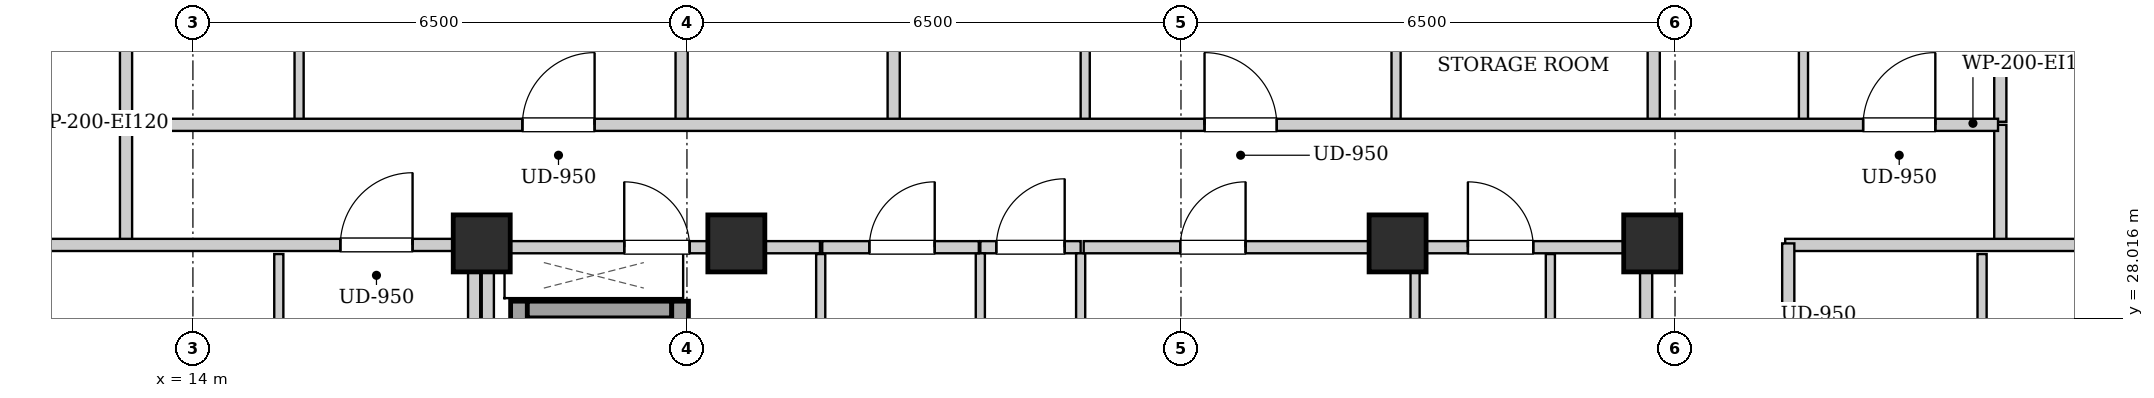
"""IFC4 building model, lengths in metres.
Left out: names, types, materials, properties, quantities, classifications, styles, units other than length and angle.
Written with IfcOpenShell. Run it as: python <this file> out.ifc"""

import sys

from ifc_helpers import new_model, si_unit, direction, frame, frame_2d, origin, origin_2d, place, context, subcontext, project, spatial, rectangle, extrude, element, fill, save


model = new_model("IFC4")
c1 = context("Model", 3, precision=1e-05, world=origin(), true_north=direction((0.0, 1.0)))
c2 = subcontext(c1, "Body", "Model", "MODEL_VIEW")
j1 = project(units=[si_unit("LENGTHUNIT", "METRE"), si_unit("PLANEANGLEUNIT", "RADIAN")], contexts=[c1])
p1 = place(None, origin())
s1 = spatial("IfcSite", under=j1, at=p1, CompositionType="ELEMENT")
p2 = place(p1, origin())
s2 = spatial("IfcBuilding", under=s1, at=p2, CompositionType="ELEMENT")
p3 = place(p2, frame((0.0, 0.0, 234.3)))
s3 = spatial("IfcBuildingStorey", under=s2, at=p3, CompositionType="ELEMENT", Elevation=234.3)
for number, where, z_axis, x_axis in (
    (1, (17.8, 29.0, 0.0), (0.0, 0.0, 1.0), (1.0, 0.0, 0.0)),
    (2, (21.15, 29.0, 0.0), (0.0, 0.0, 1.0), (1.0, 0.0, 0.0)),
    (3, (29.85, 29.0, 0.0), (0.0, 0.0, 1.0), (1.0, 0.0, 0.0)),
    (4, (33.2, 29.0, 0.0), (0.0, 0.0, 1.0), (1.0, 0.0, 0.0)),
):
    element("IfcColumn", number, at=place(p3, frame(where, z_axis=z_axis, x_axis=x_axis)), inside=s3, PredefinedType="COLUMN", context=c2, shape_type="SweptSolid", body=[
        extrude(rectangle(XDim=0.75, YDim=0.75, at=origin_2d()), origin(), (0.0, 0.0, 1.0), 3.4),
    ])
p4 = place(p3, frame((18.29, 24.1, 0.0), z_axis=(0.0, 0.0, 1.0), x_axis=(0.0, 1.0, 0.0)))
e5 = element("IfcWall", 5, at=p4, inside=s3, PredefinedType="SHEAR", context=c2, shape_type="SweptSolid", body=[
    extrude(rectangle(XDim=4.14, YDim=0.22, at=frame_2d((2.07, 0.0))), origin(), (0.0, 0.0, 1.0), 3.14),
])
p5 = place(p3, frame((18.4, 28.13, 0.0), z_axis=(0.0, 0.0, 1.0), x_axis=(1.0, 0.0, 0.0)))
e6 = element("IfcWall", 6, at=p5, inside=s3, PredefinedType="SHEAR", context=c2, shape_type="SweptSolid", body=[
    extrude(rectangle(XDim=1.9, YDim=0.22, at=frame_2d((0.95, 0.0))), origin(), (0.0, 0.0, 1.0), 3.14),
])
p6 = place(p3, frame((20.41, 26.06, 0.0), z_axis=(0.0, 0.0, 1.0), x_axis=(0.0, 1.0, 0.0)))
e7 = element("IfcWall", 7, at=p6, inside=s3, PredefinedType="SHEAR", context=c2, shape_type="SweptSolid", body=[
    extrude(rectangle(XDim=2.18, YDim=0.22, at=frame_2d((1.09, 0.0))), origin(), (0.0, 0.0, 1.0), 3.14),
])
p7 = place(p6, frame((0.54, 0.0, 0.0)))
e8 = element("IfcOpeningElement", 8, at=p7, cuts=e7, PredefinedType="OPENING", context=c2, shape_type="SweptSolid", body=[
    extrude(rectangle(XDim=1.1, YDim=2.15, at=frame_2d((0.55, 1.075))), frame((0.0, 0.12, 0.0), z_axis=(0.0, -1.0, 0.0), x_axis=(1.0, 0.0, 0.0)), (0.0, 0.0, 1.0), 0.24),
])
for number, where, z_axis, x_axis in (
    (9, (17.88, 24.12, 0.0), (0.0, 0.0, 1.0), (0.0, 1.0, 0.0)),
    (10, (33.12, 24.12, 0.0), (0.0, 0.0, 1.0), (0.0, 1.0, 0.0)),
):
    element("IfcWall", number, at=place(p3, frame(where, z_axis=z_axis, x_axis=x_axis)), inside=s3, PredefinedType="PARTITIONING", context=c2, shape_type="SweptSolid", body=[
        extrude(rectangle(XDim=4.76, YDim=0.16, at=frame_2d((2.38, 0.0))), origin(), (0.0, 0.0, 1.0), 3.14),
    ])
p8 = place(p3, frame((24.36, 28.95, 0.0), z_axis=(0.0, 0.0, 1.0), x_axis=(1.0, 0.0, 0.0)))
e11 = element("IfcWall", 11, at=p8, inside=s3, PredefinedType="PARTITIONING", context=c2, shape_type="SweptSolid", body=[
    extrude(rectangle(XDim=1.32, YDim=0.16, at=frame_2d((0.66, 0.0))), origin(), (0.0, 0.0, 1.0), 2.668),
])
p9 = place(p8, frame((0.21, 0.0, 0.0)))
e12 = element("IfcOpeningElement", 12, at=p9, cuts=e11, PredefinedType="OPENING", context=c2, shape_type="SweptSolid", body=[
    extrude(rectangle(XDim=0.9, YDim=2.05, at=frame_2d((0.45, 1.025))), frame((0.0, 0.09, 0.0), z_axis=(0.0, -1.0, 0.0), x_axis=(1.0, 0.0, 0.0)), (0.0, 0.0, 1.0), 0.18),
])
p10 = place(p3, frame((17.96, 28.95, 0.0), z_axis=(0.0, 0.0, 1.0), x_axis=(1.0, 0.0, 0.0)))
e13 = element("IfcWall", 13, at=p10, inside=s3, PredefinedType="PARTITIONING", context=c2, shape_type="SweptSolid", body=[
    extrude(rectangle(XDim=4.29, YDim=0.16, at=frame_2d((2.145, 0.0))), origin(), (0.0, 0.0, 1.0), 2.668),
])
p11 = place(p10, frame((1.715, 0.0, 0.0)))
e14 = element("IfcOpeningElement", 14, at=p11, cuts=e13, PredefinedType="OPENING", context=c2, shape_type="SweptSolid", body=[
    extrude(rectangle(XDim=0.86, YDim=2.05, at=frame_2d((0.43, 1.025))), frame((0.0, 0.09, 0.0), z_axis=(0.0, -1.0, 0.0), x_axis=(1.0, 0.0, 0.0)), (0.0, 0.0, 1.0), 0.18),
])
for number, where, z_axis, x_axis in (
    (15, (24.36, 25.0, 0.0), (0.0, 0.0, 1.0), (0.0, 1.0, 0.0)),
    (16, (25.68, 25.0, 0.0), (0.0, 0.0, 1.0), (0.0, 1.0, 0.0)),
):
    element("IfcWall", number, at=place(p3, frame(where, z_axis=z_axis, x_axis=x_axis)), inside=s3, PredefinedType="PARTITIONING", context=c2, shape_type="SweptSolid", body=[
        extrude(rectangle(XDim=3.87, YDim=0.12, at=frame_2d((1.935, 0.0))), origin(), (0.0, 0.0, 1.0), 3.14),
    ])
p12 = place(p3, frame((30.08, 26.18, 0.0), z_axis=(0.0, 0.0, 1.0), x_axis=(0.0, 1.0, 0.0)))
e17 = element("IfcWall", 17, at=p12, inside=s3, PredefinedType="PARTITIONING", context=c2, shape_type="SweptSolid", body=[
    extrude(rectangle(XDim=2.68, YDim=0.12, at=frame_2d((1.34, 0.0))), origin(), (0.0, 0.0, 1.0), 3.14),
])
p13 = place(p3, frame((31.86, 26.2, 0.0), z_axis=(0.0, 0.0, 1.0), x_axis=(0.0, 1.0, 0.0)))
e18 = element("IfcWall", 18, at=p13, inside=s3, PredefinedType="PARTITIONING", context=c2, shape_type="SweptSolid", body=[
    extrude(rectangle(XDim=2.66, YDim=0.12, at=frame_2d((1.33, 0.0))), origin(), (0.0, 0.0, 1.0), 3.14),
])
p14 = place(p13, frame((0.92, 0.0, 0.0)))
e19 = element("IfcOpeningElement", 19, at=p14, cuts=e18, PredefinedType="OPENING", context=c2, shape_type="SweptSolid", body=[
    extrude(rectangle(XDim=0.86, YDim=2.05, at=frame_2d((0.43, 1.025))), frame((0.0, 0.07, 0.0), z_axis=(0.0, -1.0, 0.0), x_axis=(1.0, 0.0, 0.0)), (0.0, 0.0, 1.0), 0.14),
])
p15 = place(p3, frame((30.08, 28.95, 0.0), z_axis=(0.0, 0.0, 1.0), x_axis=(1.0, 0.0, 0.0)))
e20 = element("IfcWall", 20, at=p15, inside=s3, PredefinedType="PARTITIONING", context=c2, shape_type="SweptSolid", body=[
    extrude(rectangle(XDim=2.96, YDim=0.16, at=frame_2d((1.48, 0.0))), origin(), (0.0, 0.0, 1.0), 3.14),
])
p16 = place(p15, frame((0.695, 0.0, 0.0)))
e21 = element("IfcOpeningElement", 21, at=p16, cuts=e20, PredefinedType="OPENING", context=c2, shape_type="SweptSolid", body=[
    extrude(rectangle(XDim=0.86, YDim=2.05, at=frame_2d((0.43, 1.025))), frame((0.0, 0.09, 0.0), z_axis=(0.0, -1.0, 0.0), x_axis=(1.0, 0.0, 0.0)), (0.0, 0.0, 1.0), 0.18),
])
p17 = place(p3, frame((22.26, 25.0, 0.0), z_axis=(0.0, 0.0, 1.0), x_axis=(0.0, 1.0, 0.0)))
e22 = element("IfcWall", 22, at=p17, inside=s3, PredefinedType="PARTITIONING", context=c2, shape_type="SweptSolid", body=[
    extrude(rectangle(XDim=3.86, YDim=0.12, at=frame_2d((1.93, 0.0))), origin(), (0.0, 0.0, 1.0), 3.14),
])
p18 = place(p3, frame((22.28, 28.95, 0.0), z_axis=(0.0, 0.0, 1.0), x_axis=(1.0, 0.0, 0.0)))
e23 = element("IfcWall", 23, at=p18, inside=s3, PredefinedType="PARTITIONING", context=c2, shape_type="SweptSolid", body=[
    extrude(rectangle(XDim=2.06, YDim=0.16, at=frame_2d((1.03, 0.0))), origin(), (0.0, 0.0, 1.0), 2.668),
])
p19 = place(p18, frame((0.62, 0.0, 0.0)))
e24 = element("IfcOpeningElement", 24, at=p19, cuts=e23, PredefinedType="OPENING", context=c2, shape_type="SweptSolid", body=[
    extrude(rectangle(XDim=0.86, YDim=2.05, at=frame_2d((0.43, 1.025))), frame((0.0, 0.09, 0.0), z_axis=(0.0, -1.0, 0.0), x_axis=(1.0, 0.0, 0.0)), (0.0, 0.0, 1.0), 0.18),
])
p20 = place(p3, frame((25.72, 28.95, 0.0), z_axis=(0.0, 0.0, 1.0), x_axis=(1.0, 0.0, 0.0)))
e25 = element("IfcWall", 25, at=p20, inside=s3, PredefinedType="PARTITIONING", context=c2, shape_type="SweptSolid", body=[
    extrude(rectangle(XDim=4.32, YDim=0.16, at=frame_2d((2.16, 0.0))), origin(), (0.0, 0.0, 1.0), 2.668),
])
p21 = place(p20, frame((1.27, 0.0, 0.0)))
e26 = element("IfcOpeningElement", 26, at=p21, cuts=e25, PredefinedType="OPENING", context=c2, shape_type="SweptSolid", body=[
    extrude(rectangle(XDim=0.86, YDim=2.05, at=frame_2d((0.43, 1.025))), frame((0.0, 0.09, 0.0), z_axis=(0.0, -1.0, 0.0), x_axis=(1.0, 0.0, 0.0)), (0.0, 0.0, 1.0), 0.18),
])
for number, where, z_axis, x_axis in (
    (27, (13.12, 28.98, 0.0), (0.0, 0.0, 1.0), (0.0, 1.0, 0.0)),
    (28, (37.78, 28.98, 0.0), (0.0, 0.0, 1.0), (0.0, 1.0, 0.0)),
):
    element("IfcWall", number, at=place(p3, frame(where, z_axis=z_axis, x_axis=x_axis)), inside=s3, PredefinedType="PARTITIONING", context=c2, shape_type="SweptSolid", body=[
        extrude(rectangle(XDim=1.58, YDim=0.16, at=frame_2d((0.79, 0.0))), origin(), (0.0, 0.0, 1.0), 3.14),
    ])
p22 = place(p3, frame((34.95, 28.98, 0.0), z_axis=(0.0, 0.0, 1.0), x_axis=(1.0, 0.0, 0.0)))
e29 = element("IfcWall", 29, at=p22, inside=s3, PredefinedType="PARTITIONING", context=c2, shape_type="SweptSolid", body=[
    extrude(rectangle(XDim=5.07, YDim=0.16, at=frame_2d((2.535, 0.0))), origin(), (0.0, 0.0, 1.0), 2.668),
])
p23 = place(p3, frame((13.12, 30.6, 0.0), z_axis=(0.0, 0.0, 1.0), x_axis=(0.0, 1.0, 0.0)))
e30 = element("IfcWall", 30, at=p23, inside=s3, PredefinedType="PARTITIONING", context=c2, shape_type="SweptSolid", body=[
    extrude(rectangle(XDim=2.91, YDim=0.16, at=frame_2d((1.455, 0.0))), origin(), (0.0, 0.0, 1.0), 3.14),
])
p24 = place(p3, frame((20.43, 30.6, 0.0), z_axis=(0.0, 0.0, 1.0), x_axis=(0.0, 1.0, 0.0)))
e31 = element("IfcWall", 31, at=p24, inside=s3, PredefinedType="PARTITIONING", context=c2, shape_type="SweptSolid", body=[
    extrude(rectangle(XDim=9.32, YDim=0.16, at=frame_2d((4.66, 0.0))), origin(), (0.0, 0.0, 1.0), 3.14),
])
p25 = place(p3, frame((15.397, 30.6, 0.0), z_axis=(0.0, 0.0, 1.0), x_axis=(0.0, 1.0, 0.0)))
e32 = element("IfcWall", 32, at=p25, inside=s3, PredefinedType="PARTITIONING", context=c2, shape_type="SweptSolid", body=[
    extrude(rectangle(XDim=2.85, YDim=0.12, at=frame_2d((1.425, 0.0))), origin(), (0.0, 0.0, 1.0), 3.14),
])
p26 = place(p25, frame((0.995, 0.0, 0.0)))
e33 = element("IfcOpeningElement", 33, at=p26, cuts=e32, PredefinedType="OPENING", context=c2, shape_type="SweptSolid", body=[
    extrude(rectangle(XDim=0.86, YDim=2.05, at=frame_2d((0.43, 1.025))), frame((0.0, 0.07, 0.0), z_axis=(0.0, -1.0, 0.0), x_axis=(1.0, 0.0, 0.0)), (0.0, 0.0, 1.0), 0.14),
])
p27 = place(p3, frame((23.22, 30.6, 0.0), z_axis=(0.0, 0.0, 1.0), x_axis=(0.0, 1.0, 0.0)))
e34 = element("IfcWall", 34, at=p27, inside=s3, PredefinedType="PARTITIONING", context=c2, shape_type="SweptSolid", body=[
    extrude(rectangle(XDim=9.32, YDim=0.16, at=frame_2d((4.66, 0.0))), origin(), (0.0, 0.0, 1.0), 3.14),
])
p28 = place(p3, frame((25.74, 30.6, 0.0), z_axis=(0.0, 0.0, 1.0), x_axis=(0.0, 1.0, 0.0)))
e35 = element("IfcWall", 35, at=p28, inside=s3, PredefinedType="PARTITIONING", context=c2, shape_type="SweptSolid", body=[
    extrude(rectangle(XDim=2.85, YDim=0.12, at=frame_2d((1.425, 0.0))), origin(), (0.0, 0.0, 1.0), 3.14),
])
p29 = place(p28, frame((0.995, 0.0, 0.0)))
e36 = element("IfcOpeningElement", 36, at=p29, cuts=e35, PredefinedType="OPENING", context=c2, shape_type="SweptSolid", body=[
    extrude(rectangle(XDim=0.86, YDim=2.05, at=frame_2d((0.43, 1.025))), frame((0.0, 0.07, 0.0), z_axis=(0.0, -1.0, 0.0), x_axis=(1.0, 0.0, 0.0)), (0.0, 0.0, 1.0), 0.14),
])
p30 = place(p3, frame((29.83, 30.6, 0.0), z_axis=(0.0, 0.0, 1.0), x_axis=(0.0, 1.0, 0.0)))
e37 = element("IfcWall", 37, at=p30, inside=s3, PredefinedType="PARTITIONING", context=c2, shape_type="SweptSolid", body=[
    extrude(rectangle(XDim=2.85, YDim=0.12, at=frame_2d((1.425, 0.0))), origin(), (0.0, 0.0, 1.0), 3.14),
])
p31 = place(p30, frame((0.975, 0.0, 0.0)))
e38 = element("IfcOpeningElement", 38, at=p31, cuts=e37, PredefinedType="OPENING", context=c2, shape_type="SweptSolid", body=[
    extrude(rectangle(XDim=0.9, YDim=2.05, at=frame_2d((0.45, 1.025))), frame((0.0, 0.07, 0.0), z_axis=(0.0, -1.0, 0.0), x_axis=(1.0, 0.0, 0.0)), (0.0, 0.0, 1.0), 0.14),
])
p32 = place(p3, frame((37.78, 30.6, 0.0), z_axis=(0.0, 0.0, 1.0), x_axis=(0.0, 1.0, 0.0)))
e39 = element("IfcWall", 39, at=p32, inside=s3, PredefinedType="PARTITIONING", context=c2, shape_type="SweptSolid", body=[
    extrude(rectangle(XDim=2.91, YDim=0.16, at=frame_2d((1.455, 0.0))), origin(), (0.0, 0.0, 1.0), 3.14),
])
p33 = place(p3, frame((33.22, 30.6, 0.0), z_axis=(0.0, 0.0, 1.0), x_axis=(0.0, 1.0, 0.0)))
e40 = element("IfcWall", 40, at=p33, inside=s3, PredefinedType="PARTITIONING", context=c2, shape_type="SweptSolid", body=[
    extrude(rectangle(XDim=7.34, YDim=0.16, at=frame_2d((3.67, 0.0))), origin(), (0.0, 0.0, 1.0), 2.668),
])
p34 = place(p3, frame((35.19, 30.6, 0.0), z_axis=(0.0, 0.0, 1.0), x_axis=(0.0, 1.0, 0.0)))
e41 = element("IfcWall", 41, at=p34, inside=s3, PredefinedType="PARTITIONING", context=c2, shape_type="SweptSolid", body=[
    extrude(rectangle(XDim=2.85, YDim=0.12, at=frame_2d((1.425, 0.0))), origin(), (0.0, 0.0, 1.0), 3.14),
])
p35 = place(p34, frame((0.995, 0.0, 0.0)))
e42 = element("IfcOpeningElement", 42, at=p35, cuts=e41, PredefinedType="OPENING", context=c2, shape_type="SweptSolid", body=[
    extrude(rectangle(XDim=0.86, YDim=2.05, at=frame_2d((0.43, 1.025))), frame((0.0, 0.07, 0.0), z_axis=(0.0, -1.0, 0.0), x_axis=(1.0, 0.0, 0.0)), (0.0, 0.0, 1.0), 0.14),
])
p36 = place(p3, frame((10.88, 28.98, 0.0), z_axis=(0.0, 0.0, 1.0), x_axis=(1.0, 0.0, 0.0)))
e43 = element("IfcWall", 43, at=p36, inside=s3, PredefinedType="PARTITIONING", context=c2, shape_type="SweptSolid", body=[
    extrude(rectangle(XDim=6.88, YDim=0.16, at=frame_2d((3.44, 0.0))), origin(), (0.0, 0.0, 1.0), 2.668),
])
p37 = place(p36, frame((5.06, 0.0, 0.0)))
e44 = element("IfcOpeningElement", 44, at=p37, cuts=e43, PredefinedType="OPENING", context=c2, shape_type="SweptSolid", body=[
    extrude(rectangle(XDim=0.95, YDim=2.1, at=frame_2d((0.475, 1.05))), frame((0.0, 0.09, 0.0), z_axis=(0.0, -1.0, 0.0), x_axis=(1.0, 0.0, 0.0)), (0.0, 0.0, 1.0), 0.18),
])
p38 = place(p3, frame((15.13, 25.052, 0.0), z_axis=(0.0, 0.0, 1.0), x_axis=(0.0, 1.0, 0.0)))
e45 = element("IfcWall", 45, at=p38, inside=s3, PredefinedType="PARTITIONING", context=c2, shape_type="SweptSolid", body=[
    extrude(rectangle(XDim=3.808, YDim=0.12, at=frame_2d((1.904, 0.0))), origin(), (0.0, 0.0, 1.0), 3.14),
])
p39 = place(p38, frame((1.454, 0.0, 0.0)))
e46 = element("IfcOpeningElement", 46, at=p39, cuts=e45, PredefinedType="OPENING", context=c2, shape_type="SweptSolid", body=[
    extrude(rectangle(XDim=0.9, YDim=2.05, at=frame_2d((0.45, 1.025))), frame((0.0, 0.07, 0.0), z_axis=(0.0, -1.0, 0.0), x_axis=(1.0, 0.0, 0.0)), (0.0, 0.0, 1.0), 0.14),
])
p40 = place(p3, frame((37.54, 25.052, 0.0), z_axis=(0.0, 0.0, 1.0), x_axis=(0.0, 1.0, 0.0)))
e47 = element("IfcWall", 47, at=p40, inside=s3, PredefinedType="PARTITIONING", context=c2, shape_type="SweptSolid", body=[
    extrude(rectangle(XDim=3.808, YDim=0.12, at=frame_2d((1.904, 0.0))), origin(), (0.0, 0.0, 1.0), 3.14),
])
p41 = place(p40, frame((1.454, 0.0, 0.0)))
e48 = element("IfcOpeningElement", 48, at=p41, cuts=e47, PredefinedType="OPENING", context=c2, shape_type="SweptSolid", body=[
    extrude(rectangle(XDim=0.9, YDim=2.05, at=frame_2d((0.45, 1.025))), frame((0.0, 0.07, 0.0), z_axis=(0.0, -1.0, 0.0), x_axis=(1.0, 0.0, 0.0)), (0.0, 0.0, 1.0), 0.14),
])
p42 = place(p3, frame((13.15, 30.56, 0.0), z_axis=(0.0, 0.0, 1.0), x_axis=(1.0, 0.0, 0.0)))
e49 = element("IfcWall", 49, at=p42, inside=s3, PredefinedType="PARTITIONING", context=c2, shape_type="SweptSolid", body=[
    extrude(rectangle(XDim=24.6, YDim=0.16, at=frame_2d((12.3, 0.0))), origin(), (0.0, 0.0, 1.0), 3.14),
])
p43 = place(p42, frame((5.185, 0.0, 0.0)))
e50 = element("IfcOpeningElement", 50, at=p43, cuts=e49, PredefinedType="OPENING", context=c2, shape_type="SweptSolid", body=[
    extrude(rectangle(XDim=0.95, YDim=2.1, at=frame_2d((0.475, 1.05))), frame((0.0, 0.09, 0.0), z_axis=(0.0, -1.0, 0.0), x_axis=(1.0, 0.0, 0.0)), (0.0, 0.0, 1.0), 0.18),
])
p44 = place(p42, frame((14.16, 0.0, 0.0)))
e51 = element("IfcOpeningElement", 51, at=p44, cuts=e49, PredefinedType="OPENING", context=c2, shape_type="SweptSolid", body=[
    extrude(rectangle(XDim=0.95, YDim=2.1, at=frame_2d((0.475, 1.05))), frame((0.0, 0.09, 0.0), z_axis=(0.0, -1.0, 0.0), x_axis=(1.0, 0.0, 0.0)), (0.0, 0.0, 1.0), 0.18),
])
p45 = place(p42, frame((22.825, 0.0, 0.0)))
e52 = element("IfcOpeningElement", 52, at=p45, cuts=e49, PredefinedType="OPENING", context=c2, shape_type="SweptSolid", body=[
    extrude(rectangle(XDim=0.95, YDim=2.1, at=frame_2d((0.475, 1.05))), frame((0.0, 0.09, 0.0), z_axis=(0.0, -1.0, 0.0), x_axis=(1.0, 0.0, 0.0)), (0.0, 0.0, 1.0), 0.18),
])
p46 = place(p3, frame((17.7, 15.02, 0.0), z_axis=(0.0, 0.0, 1.0), x_axis=(0.0, 1.0, 0.0)))
e53 = element("IfcWall", 53, at=p46, inside=s3, PredefinedType="PARTITIONING", context=c2, shape_type="SweptSolid", body=[
    extrude(rectangle(XDim=13.98, YDim=0.16, at=frame_2d((6.99, 0.0))), origin(), (0.0, 0.0, 1.0), 3.14),
])
p47 = place(p3, frame((34.99, 15.07, 0.0), z_axis=(0.0, 0.0, 1.0), x_axis=(0.0, 1.0, 0.0)))
e54 = element("IfcWall", 54, at=p47, inside=s3, PredefinedType="PARTITIONING", context=c2, shape_type="SweptSolid", body=[
    extrude(rectangle(XDim=13.93, YDim=0.16, at=frame_2d((6.965, 0.0))), origin(), (0.0, 0.0, 1.0), 3.14),
])
p48 = place(p47, frame((4.661, 0.0, 0.0)))
e55 = element("IfcOpeningElement", 55, at=p48, cuts=e54, PredefinedType="OPENING", context=c2, shape_type="SweptSolid", body=[
    extrude(rectangle(XDim=0.95, YDim=2.1, at=frame_2d((0.475, 1.05))), frame((0.0, 0.09, 0.0), z_axis=(0.0, -1.0, 0.0), x_axis=(1.0, 0.0, 0.0)), (0.0, 0.0, 1.0), 0.18),
])
p49 = place(p47, frame((11.411, 0.0, 0.0)))
e56 = element("IfcOpeningElement", 56, at=p49, cuts=e54, PredefinedType="OPENING", context=c2, shape_type="SweptSolid", body=[
    extrude(rectangle(XDim=0.95, YDim=2.1, at=frame_2d((0.475, 1.05))), frame((0.0, 0.09, 0.0), z_axis=(0.0, -1.0, 0.0), x_axis=(1.0, 0.0, 0.0)), (0.0, 0.0, 1.0), 0.18),
])
p50 = place(p9, origin())
e57 = element("IfcDoor", 57, at=p50, inside=s3, OperationType="SINGLE_SWING_RIGHT", PredefinedType="DOOR", context=c2, shape_type="SweptSolid", body=[
    extrude(rectangle(XDim=0.9, YDim=2.05, at=frame_2d((0.45, 1.025))), frame((0.0, 0.025, 0.0), z_axis=(0.0, -1.0, 0.0), x_axis=(1.0, 0.0, 0.0)), (0.0, 0.0, 1.0), 0.05),
])
fill(e12, e57)
p51 = place(p11, origin())
e58 = element("IfcDoor", 58, at=p51, inside=s3, OperationType="SINGLE_SWING_LEFT", PredefinedType="DOOR", context=c2, shape_type="SweptSolid", body=[
    extrude(rectangle(XDim=0.86, YDim=2.05, at=frame_2d((0.43, 1.025))), frame((0.0, 0.025, 0.0), z_axis=(0.0, -1.0, 0.0), x_axis=(1.0, 0.0, 0.0)), (0.0, 0.0, 1.0), 0.05),
])
fill(e14, e58)
p52 = place(p16, origin())
e59 = element("IfcDoor", 59, at=p52, inside=s3, OperationType="SINGLE_SWING_LEFT", PredefinedType="DOOR", context=c2, shape_type="SweptSolid", body=[
    extrude(rectangle(XDim=0.86, YDim=2.05, at=frame_2d((0.43, 1.025))), frame((0.0, 0.025, 0.0), z_axis=(0.0, -1.0, 0.0), x_axis=(1.0, 0.0, 0.0)), (0.0, 0.0, 1.0), 0.05),
])
fill(e21, e59)
p53 = place(p19, origin())
e60 = element("IfcDoor", 60, at=p53, inside=s3, OperationType="SINGLE_SWING_RIGHT", PredefinedType="DOOR", context=c2, shape_type="SweptSolid", body=[
    extrude(rectangle(XDim=0.86, YDim=2.05, at=frame_2d((0.43, 1.025))), frame((0.0, 0.025, 0.0), z_axis=(0.0, -1.0, 0.0), x_axis=(1.0, 0.0, 0.0)), (0.0, 0.0, 1.0), 0.05),
])
fill(e24, e60)
p54 = place(p21, origin())
e61 = element("IfcDoor", 61, at=p54, inside=s3, OperationType="SINGLE_SWING_RIGHT", PredefinedType="DOOR", context=c2, shape_type="SweptSolid", body=[
    extrude(rectangle(XDim=0.86, YDim=2.05, at=frame_2d((0.43, 1.025))), frame((0.0, 0.025, 0.0), z_axis=(0.0, -1.0, 0.0), x_axis=(1.0, 0.0, 0.0)), (0.0, 0.0, 1.0), 0.05),
])
fill(e26, e61)
p55 = place(p37, origin())
e62 = element("IfcDoor", 62, at=p55, inside=s3, OperationType="SINGLE_SWING_RIGHT", PredefinedType="DOOR", context=c2, shape_type="SweptSolid", body=[
    extrude(rectangle(XDim=0.95, YDim=2.1, at=frame_2d((0.475, 1.05))), frame((0.0, 0.025, 0.0), z_axis=(0.0, -1.0, 0.0), x_axis=(1.0, 0.0, 0.0)), (0.0, 0.0, 1.0), 0.05),
])
fill(e44, e62)
p56 = place(p43, origin())
e63 = element("IfcDoor", 63, at=p56, inside=s3, OperationType="SINGLE_SWING_RIGHT", PredefinedType="DOOR", context=c2, shape_type="SweptSolid", body=[
    extrude(rectangle(XDim=0.95, YDim=2.1, at=frame_2d((0.475, 1.05))), frame((0.0, 0.025, 0.0), z_axis=(0.0, -1.0, 0.0), x_axis=(1.0, 0.0, 0.0)), (0.0, 0.0, 1.0), 0.05),
])
fill(e50, e63)
p57 = place(p44, origin())
e64 = element("IfcDoor", 64, at=p57, inside=s3, OperationType="SINGLE_SWING_LEFT", PredefinedType="DOOR", context=c2, shape_type="SweptSolid", body=[
    extrude(rectangle(XDim=0.95, YDim=2.1, at=frame_2d((0.475, 1.05))), frame((0.0, 0.025, 0.0), z_axis=(0.0, -1.0, 0.0), x_axis=(1.0, 0.0, 0.0)), (0.0, 0.0, 1.0), 0.05),
])
fill(e51, e64)
p58 = place(p45, origin())
e65 = element("IfcDoor", 65, at=p58, inside=s3, OperationType="SINGLE_SWING_RIGHT", PredefinedType="DOOR", context=c2, shape_type="SweptSolid", body=[
    extrude(rectangle(XDim=0.95, YDim=2.1, at=frame_2d((0.475, 1.05))), frame((0.0, 0.025, 0.0), z_axis=(0.0, -1.0, 0.0), x_axis=(1.0, 0.0, 0.0)), (0.0, 0.0, 1.0), 0.05),
])
fill(e52, e65)
save(model, sys.argv[1])
